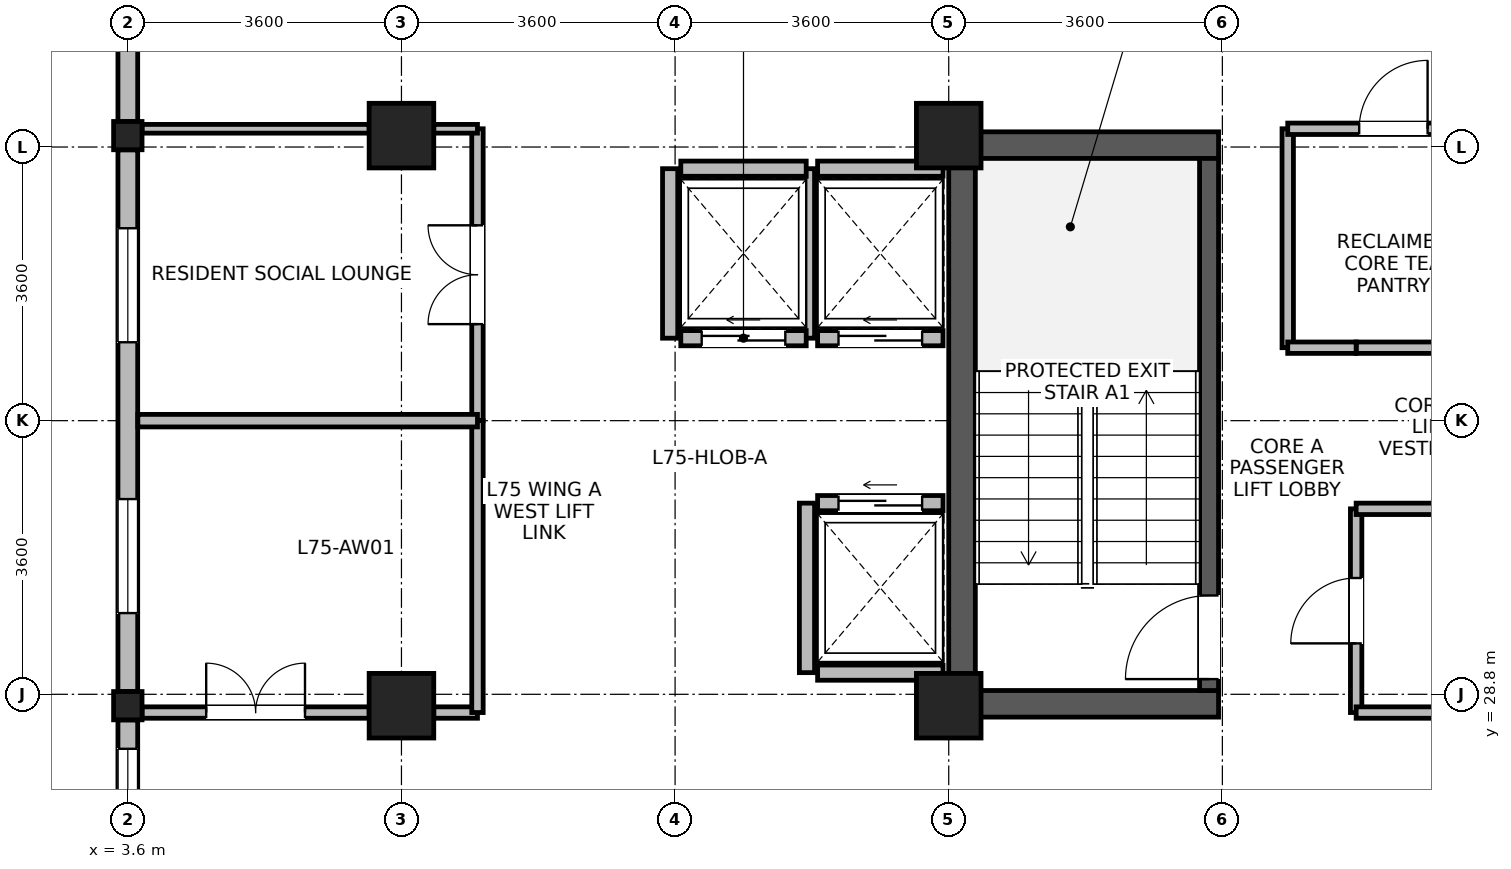
"""IFC4 building model, lengths in metres.
Left out: names, types, materials, properties, quantities, classifications, styles, units other than length and angle.
Written with IfcOpenShell. Run it as: python <this file> out.ifc"""

import sys

from ifc_helpers import new_model, si_unit, direction, frame, frame_2d, origin, origin_2d, place, context, subcontext, project, spatial, rectangle, i_section, extrude, source, transform, mapped, element, fill, save


model = new_model("IFC4")
c1 = context("Model", 3, precision=1e-05, world=origin(), true_north=direction((0.0, 1.0)))
c2 = subcontext(c1, "Body", "Model", "MODEL_VIEW")
j1 = project(units=[si_unit("LENGTHUNIT", "METRE"), si_unit("PLANEANGLEUNIT", "RADIAN")], contexts=[c1])
p1 = place(None, origin())
s1 = spatial("IfcSite", under=j1, at=p1, CompositionType="ELEMENT")
p2 = place(p1, origin())
s2 = spatial("IfcBuilding", under=s1, at=p2, CompositionType="ELEMENT")
p3 = place(p2, frame((0.0, 0.0, 290.6)))
s3 = spatial("IfcBuildingStorey", under=s2, at=p3, CompositionType="ELEMENT", Elevation=290.6)
p4 = place(p3, frame((14.575, 28.5, 0.0), z_axis=(0.0, 0.0, 1.0), x_axis=(0.0, 1.0, 0.0)))
e1 = element("IfcWall", 1, at=p4, inside=s3, PredefinedType="SHEAR", context=c2, shape_type="SweptSolid", body=[
    extrude(rectangle(XDim=7.7, YDim=0.35, at=frame_2d((3.85, 0.0))), origin(), (0.0, 0.0, 1.0), 3.475),
])
for number, where, z_axis, x_axis in (
    (2, (14.75, 28.675, 0.0), (0.0, 0.0, 1.0), (1.0, 0.0, 0.0)),
    (3, (14.75, 36.025, 0.0), (0.0, 0.0, 1.0), (1.0, 0.0, 0.0)),
):
    element("IfcWall", number, at=place(p3, frame(where, z_axis=z_axis, x_axis=x_axis)), inside=s3, PredefinedType="SHEAR", context=c2, shape_type="SweptSolid", body=[
        extrude(rectangle(XDim=3.2, YDim=0.35, at=frame_2d((1.6, 0.0))), origin(), (0.0, 0.0, 1.0), 3.475),
    ])
p5 = place(p3, frame((17.825, 28.85, 0.0), z_axis=(0.0, 0.0, 1.0), x_axis=(0.0, 1.0, 0.0)))
e4 = element("IfcWall", 4, at=p5, inside=s3, PredefinedType="SHEAR", context=c2, shape_type="SweptSolid", body=[
    extrude(rectangle(XDim=7.0, YDim=0.25, at=frame_2d((3.5, 0.0))), origin(), (0.0, 0.0, 1.0), 3.475),
])
p6 = place(p5, frame((0.15, 0.0, 0.0)))
e5 = element("IfcOpeningElement", 5, at=p6, cuts=e4, PredefinedType="OPENING", context=c2, shape_type="SweptSolid", body=[
    extrude(rectangle(XDim=1.1, YDim=2.08, at=frame_2d((0.55, 1.04))), frame((0.0, 0.135, 0.0), z_axis=(0.0, -1.0, 0.0), x_axis=(1.0, 0.0, 0.0)), (0.0, 0.0, 1.0), 0.27),
])
m1 = source(origin(), c2, "Body", "SweptSolid", [
    extrude(rectangle(XDim=0.85, YDim=0.85, at=origin_2d()), origin(), (0.0, 0.0, 1.0), 3.7),
])
for number, where, z_axis, x_axis in (
    (6, (7.2, 28.65, 0.0), (0.0, 0.0, 1.0), (1.0, 0.0, 0.0)),
    (7, (7.2, 36.15, 0.0), (0.0, 0.0, 1.0), (1.0, 0.0, 0.0)),
    (8, (14.4, 28.65, 0.0), (0.0, 0.0, 1.0), (1.0, 0.0, 0.0)),
    (9, (14.4, 36.15, 0.0), (0.0, 0.0, 1.0), (1.0, 0.0, 0.0)),
):
    element("IfcColumn", number, at=place(p3, frame(where, z_axis=z_axis, x_axis=x_axis)), inside=s3, PredefinedType="COLUMN", context=c2, shape_type="MappedRepresentation", body=[
        mapped(m1, transform((0.0, 0.0, 0.0), x_axis=(1.0, 0.0, 0.0), y_axis=(0.0, 1.0, 0.0), z_axis=(0.0, 0.0, 1.0), scale=1.0)),
    ])
m2 = source(origin(), c2, "Body", "SweptSolid", [
    extrude(i_section(OverallWidth=0.374, OverallDepth=0.372, WebThickness=0.015, FlangeThickness=0.026, FilletRadius=0.015, at=origin_2d()), origin(), (0.0, 0.0, 1.0), 3.7),
])
for number, where, z_axis, x_axis in (
    (10, (3.6, 28.65, 0.0), (0.0, 0.0, 1.0), (1.0, 0.0, 0.0)),
    (11, (3.6, 36.15, 0.0), (0.0, 0.0, 1.0), (1.0, 0.0, 0.0)),
):
    element("IfcColumn", number, at=place(p3, frame(where, z_axis=z_axis, x_axis=x_axis)), inside=s3, PredefinedType="COLUMN", context=c2, shape_type="MappedRepresentation", body=[
        mapped(m2, transform((0.0, 0.0, 0.0), x_axis=(1.0, 0.0, 0.0), y_axis=(0.0, 1.0, 0.0), z_axis=(0.0, 0.0, 1.0), scale=1.0)),
    ])
p7 = place(p3, frame((3.6, 36.337, 0.0), z_axis=(0.0, 0.0, 1.0), x_axis=(0.0, 1.0, 0.0)))
e12 = element("IfcWall", 12, at=p7, inside=s3, PredefinedType="STANDARD", context=c2, shape_type="SweptSolid", body=[
    extrude(rectangle(XDim=3.393, YDim=0.26, at=frame_2d((1.697, 0.0))), origin(), (0.0, 0.0, 1.0), 3.455),
])
p8 = place(p7, frame((0.947, 0.0, 0.85)))
e13 = element("IfcOpeningElement", 13, at=p8, cuts=e12, PredefinedType="OPENING", context=c2, shape_type="SweptSolid", body=[
    extrude(rectangle(XDim=1.5, YDim=1.85, at=frame_2d((0.75, 0.925))), frame((0.0, 0.14, 0.0), z_axis=(0.0, -1.0, 0.0), x_axis=(1.0, 0.0, 0.0)), (0.0, 0.0, 1.0), 0.28),
])
p9 = place(p3, frame((3.6, 28.837, 0.0), z_axis=(0.0, 0.0, 1.0), x_axis=(0.0, 1.0, 0.0)))
e14 = element("IfcWall", 14, at=p9, inside=s3, PredefinedType="STANDARD", context=c2, shape_type="SweptSolid", body=[
    extrude(rectangle(XDim=7.126, YDim=0.26, at=frame_2d((3.563, 0.0))), origin(), (0.0, 0.0, 1.0), 3.055),
])
p10 = place(p9, frame((1.031, 0.0, 0.85)))
e15 = element("IfcOpeningElement", 15, at=p10, cuts=e14, PredefinedType="OPENING", context=c2, shape_type="SweptSolid", body=[
    extrude(rectangle(XDim=1.5, YDim=1.85, at=frame_2d((0.75, 0.925))), frame((0.0, 0.14, 0.0), z_axis=(0.0, -1.0, 0.0), x_axis=(1.0, 0.0, 0.0)), (0.0, 0.0, 1.0), 0.28),
])
p11 = place(p9, frame((4.594, 0.0, 0.85)))
e16 = element("IfcOpeningElement", 16, at=p11, cuts=e14, PredefinedType="OPENING", context=c2, shape_type="SweptSolid", body=[
    extrude(rectangle(XDim=1.5, YDim=1.85, at=frame_2d((0.75, 0.925))), frame((0.0, 0.14, 0.0), z_axis=(0.0, -1.0, 0.0), x_axis=(1.0, 0.0, 0.0)), (0.0, 0.0, 1.0), 0.28),
])
p12 = place(p3, frame((3.6, 25.07, 0.0), z_axis=(0.0, 0.0, 1.0), x_axis=(0.0, 1.0, 0.0)))
e17 = element("IfcWall", 17, at=p12, inside=s3, PredefinedType="STANDARD", context=c2, shape_type="SweptSolid", body=[
    extrude(rectangle(XDim=3.393, YDim=0.26, at=frame_2d((1.696, 0.0))), origin(), (0.0, 0.0, 1.0), 3.455),
])
p13 = place(p12, frame((2.063, 0.0, 0.85)))
e18 = element("IfcOpeningElement", 18, at=p13, cuts=e17, PredefinedType="OPENING", context=c2, shape_type="SweptSolid", body=[
    extrude(rectangle(XDim=0.95, YDim=1.75, at=frame_2d((0.475, 0.875))), frame((0.0, 0.14, 0.0), z_axis=(0.0, -1.0, 0.0), x_axis=(1.0, 0.0, 0.0)), (0.0, 0.0, 1.0), 0.28),
])
p14 = place(p3, frame((12.675, 33.485, 0.0), z_axis=(0.0, 0.0, 1.0), x_axis=(1.0, 0.0, 0.0)))
e19 = element("IfcWall", 19, at=p14, inside=s3, PredefinedType="PARTITIONING", context=c2, shape_type="SweptSolid", body=[
    extrude(rectangle(XDim=1.65, YDim=0.2, at=frame_2d((0.825, 0.0))), origin(), (0.0, 0.0, 1.0), 3.455),
])
p15 = place(p14, frame((0.275, 0.0, 0.0)))
e20 = element("IfcOpeningElement", 20, at=p15, cuts=e19, PredefinedType="OPENING", context=c2, shape_type="SweptSolid", body=[
    extrude(rectangle(XDim=1.1, YDim=2.12, at=frame_2d((0.55, 1.06))), frame((0.0, 0.11, 0.0), z_axis=(0.0, -1.0, 0.0), x_axis=(1.0, 0.0, 0.0)), (0.0, 0.0, 1.0), 0.22),
])
p16 = place(p3, frame((12.675, 35.715, 0.0), z_axis=(0.0, 0.0, 1.0), x_axis=(1.0, 0.0, 0.0)))
e21 = element("IfcWall", 21, at=p16, inside=s3, PredefinedType="PARTITIONING", context=c2, shape_type="SweptSolid", body=[
    extrude(rectangle(XDim=1.65, YDim=0.2, at=frame_2d((0.825, 0.0))), origin(), (0.0, 0.0, 1.0), 3.455),
])
p17 = place(p3, frame((12.535, 33.485, 0.0), z_axis=(0.0, 0.0, 1.0), x_axis=(0.0, 1.0, 0.0)))
e22 = element("IfcWall", 22, at=p17, inside=s3, PredefinedType="PARTITIONING", context=c2, shape_type="SweptSolid", body=[
    extrude(rectangle(XDim=2.23, YDim=0.2, at=frame_2d((1.115, 0.0))), origin(), (0.0, 0.0, 1.0), 3.455),
])
p18 = place(p3, frame((12.675, 29.085, 0.0), z_axis=(0.0, 0.0, 1.0), x_axis=(1.0, 0.0, 0.0)))
e23 = element("IfcWall", 23, at=p18, inside=s3, PredefinedType="PARTITIONING", context=c2, shape_type="SweptSolid", body=[
    extrude(rectangle(XDim=1.65, YDim=0.2, at=frame_2d((0.825, 0.0))), origin(), (0.0, 0.0, 1.0), 3.455),
])
p19 = place(p3, frame((12.675, 31.315, 0.0), z_axis=(0.0, 0.0, 1.0), x_axis=(1.0, 0.0, 0.0)))
e24 = element("IfcWall", 24, at=p19, inside=s3, PredefinedType="PARTITIONING", context=c2, shape_type="SweptSolid", body=[
    extrude(rectangle(XDim=1.65, YDim=0.2, at=frame_2d((0.825, 0.0))), origin(), (0.0, 0.0, 1.0), 3.455),
])
p20 = place(p19, frame((0.275, 0.0, 0.0)))
e25 = element("IfcOpeningElement", 25, at=p20, cuts=e24, PredefinedType="OPENING", context=c2, shape_type="SweptSolid", body=[
    extrude(rectangle(XDim=1.1, YDim=2.12, at=frame_2d((0.55, 1.06))), frame((0.0, 0.11, 0.0), z_axis=(0.0, -1.0, 0.0), x_axis=(1.0, 0.0, 0.0)), (0.0, 0.0, 1.0), 0.22),
])
p21 = place(p3, frame((12.535, 29.085, 0.0), z_axis=(0.0, 0.0, 1.0), x_axis=(0.0, 1.0, 0.0)))
e26 = element("IfcWall", 26, at=p21, inside=s3, PredefinedType="PARTITIONING", context=c2, shape_type="SweptSolid", body=[
    extrude(rectangle(XDim=2.23, YDim=0.2, at=frame_2d((1.115, 0.0))), origin(), (0.0, 0.0, 1.0), 3.455),
])
p22 = place(p3, frame((10.875, 33.485, 0.0), z_axis=(0.0, 0.0, 1.0), x_axis=(1.0, 0.0, 0.0)))
e27 = element("IfcWall", 27, at=p22, inside=s3, PredefinedType="PARTITIONING", context=c2, shape_type="SweptSolid", body=[
    extrude(rectangle(XDim=1.65, YDim=0.2, at=frame_2d((0.825, 0.0))), origin(), (0.0, 0.0, 1.0), 3.455),
])
p23 = place(p22, frame((0.275, 0.0, 0.0)))
e28 = element("IfcOpeningElement", 28, at=p23, cuts=e27, PredefinedType="OPENING", context=c2, shape_type="SweptSolid", body=[
    extrude(rectangle(XDim=1.1, YDim=2.12, at=frame_2d((0.55, 1.06))), frame((0.0, 0.11, 0.0), z_axis=(0.0, -1.0, 0.0), x_axis=(1.0, 0.0, 0.0)), (0.0, 0.0, 1.0), 0.22),
])
p24 = place(p3, frame((10.875, 35.715, 0.0), z_axis=(0.0, 0.0, 1.0), x_axis=(1.0, 0.0, 0.0)))
e29 = element("IfcWall", 29, at=p24, inside=s3, PredefinedType="PARTITIONING", context=c2, shape_type="SweptSolid", body=[
    extrude(rectangle(XDim=1.65, YDim=0.2, at=frame_2d((0.825, 0.0))), origin(), (0.0, 0.0, 1.0), 3.455),
])
p25 = place(p3, frame((10.735, 33.485, 0.0), z_axis=(0.0, 0.0, 1.0), x_axis=(0.0, 1.0, 0.0)))
e30 = element("IfcWall", 30, at=p25, inside=s3, PredefinedType="PARTITIONING", context=c2, shape_type="SweptSolid", body=[
    extrude(rectangle(XDim=2.23, YDim=0.2, at=frame_2d((1.115, 0.0))), origin(), (0.0, 0.0, 1.0), 3.455),
])
p26 = place(p3, frame((3.787, 28.56, 0.0), z_axis=(0.0, 0.0, 1.0), x_axis=(1.0, 0.0, 0.0)))
e31 = element("IfcWall", 31, at=p26, inside=s3, PredefinedType="PARTITIONING", context=c2, shape_type="SweptSolid", body=[
    extrude(rectangle(XDim=2.988, YDim=0.15, at=frame_2d((1.494, 0.0))), origin(), (0.0, 0.0, 1.0), 2.905),
])
p27 = place(p26, frame((0.844, 0.0, 0.0)))
e32 = element("IfcOpeningElement", 32, at=p27, cuts=e31, PredefinedType="OPENING", context=c2, shape_type="SweptSolid", body=[
    extrude(rectangle(XDim=1.3, YDim=2.12, at=frame_2d((0.65, 1.06))), frame((0.0, 0.085, 0.0), z_axis=(0.0, -1.0, 0.0), x_axis=(1.0, 0.0, 0.0)), (0.0, 0.0, 1.0), 0.17),
])
p28 = place(p3, frame((7.625, 28.56, 0.0), z_axis=(0.0, 0.0, 1.0), x_axis=(1.0, 0.0, 0.0)))
e33 = element("IfcWall", 33, at=p28, inside=s3, PredefinedType="PARTITIONING", context=c2, shape_type="SweptSolid", body=[
    extrude(rectangle(XDim=0.575, YDim=0.15, at=frame_2d((0.288, 0.0))), origin(), (0.0, 0.0, 1.0), 2.905),
])
p29 = place(p3, frame((8.2, 32.4, 0.0), z_axis=(0.0, 0.0, 1.0), x_axis=(0.0, 1.0, 0.0)))
e34 = element("IfcWall", 34, at=p29, inside=s3, PredefinedType="PARTITIONING", context=c2, shape_type="SweptSolid", body=[
    extrude(rectangle(XDim=3.84, YDim=0.15, at=frame_2d((1.92, 0.0))), origin(), (0.0, 0.0, 1.0), 3.455),
])
p30 = place(p29, frame((1.27, 0.0, 0.0)))
e35 = element("IfcOpeningElement", 35, at=p30, cuts=e34, PredefinedType="OPENING", context=c2, shape_type="SweptSolid", body=[
    extrude(rectangle(XDim=1.3, YDim=2.12, at=frame_2d((0.65, 1.06))), frame((0.0, 0.085, 0.0), z_axis=(0.0, -1.0, 0.0), x_axis=(1.0, 0.0, 0.0)), (0.0, 0.0, 1.0), 0.17),
])
p31 = place(p3, frame((8.2, 28.56, 0.0), z_axis=(0.0, 0.0, 1.0), x_axis=(0.0, 1.0, 0.0)))
e36 = element("IfcWall", 36, at=p31, inside=s3, PredefinedType="PARTITIONING", context=c2, shape_type="SweptSolid", body=[
    extrude(rectangle(XDim=3.84, YDim=0.15, at=frame_2d((1.92, 0.0))), origin(), (0.0, 0.0, 1.0), 3.455),
])
p32 = place(p3, frame((18.86, 33.36, 0.0), z_axis=(0.0, 0.0, 1.0), x_axis=(0.0, 1.0, 0.0)))
e37 = element("IfcWall", 37, at=p32, inside=s3, PredefinedType="PARTITIONING", context=c2, shape_type="SweptSolid", body=[
    extrude(rectangle(XDim=2.88, YDim=0.15, at=frame_2d((1.44, 0.0))), origin(), (0.0, 0.0, 1.0), 3.455),
])
p33 = place(p3, frame((18.86, 36.24, 0.0), z_axis=(0.0, 0.0, 1.0), x_axis=(1.0, 0.0, 0.0)))
e38 = element("IfcWall", 38, at=p33, inside=s3, PredefinedType="PARTITIONING", context=c2, shape_type="SweptSolid", body=[
    extrude(rectangle(XDim=2.78, YDim=0.15, at=frame_2d((1.39, 0.0))), origin(), (0.0, 0.0, 1.0), 2.555),
])
p34 = place(p33, frame((0.94, 0.0, 0.0)))
e39 = element("IfcOpeningElement", 39, at=p34, cuts=e38, PredefinedType="OPENING", context=c2, shape_type="SweptSolid", body=[
    extrude(rectangle(XDim=0.9, YDim=2.08, at=frame_2d((0.45, 1.04))), frame((0.0, 0.085, 0.0), z_axis=(0.0, -1.0, 0.0), x_axis=(1.0, 0.0, 0.0)), (0.0, 0.0, 1.0), 0.17),
])
p35 = place(p3, frame((19.76, 28.56, 0.0), z_axis=(0.0, 0.0, 1.0), x_axis=(0.0, 1.0, 0.0)))
e40 = element("IfcWall", 40, at=p35, inside=s3, PredefinedType="PARTITIONING", context=c2, shape_type="SweptSolid", body=[
    extrude(rectangle(XDim=2.68, YDim=0.15, at=frame_2d((1.34, 0.0))), origin(), (0.0, 0.0, 1.0), 3.455),
])
p36 = place(p35, frame((0.91, 0.0, 0.0)))
e41 = element("IfcOpeningElement", 41, at=p36, cuts=e40, PredefinedType="OPENING", context=c2, shape_type="SweptSolid", body=[
    extrude(rectangle(XDim=0.86, YDim=2.02, at=frame_2d((0.43, 1.01))), frame((0.0, 0.085, 0.0), z_axis=(0.0, -1.0, 0.0), x_axis=(1.0, 0.0, 0.0)), (0.0, 0.0, 1.0), 0.17),
])
p37 = place(p3, frame((19.76, 28.56, 0.0), z_axis=(0.0, 0.0, 1.0), x_axis=(1.0, 0.0, 0.0)))
e42 = element("IfcWall", 42, at=p37, inside=s3, PredefinedType="PARTITIONING", context=c2, shape_type="SweptSolid", body=[
    extrude(rectangle(XDim=2.0, YDim=0.15, at=frame_2d((1.0, 0.0))), origin(), (0.0, 0.0, 1.0), 2.555),
])
p38 = place(p3, frame((19.76, 31.24, 0.0), z_axis=(0.0, 0.0, 1.0), x_axis=(1.0, 0.0, 0.0)))
e43 = element("IfcWall", 43, at=p38, inside=s3, PredefinedType="PARTITIONING", context=c2, shape_type="SweptSolid", body=[
    extrude(rectangle(XDim=2.0, YDim=0.15, at=frame_2d((1.0, 0.0))), origin(), (0.0, 0.0, 1.0), 3.455),
])
p39 = place(p3, frame((19.76, 33.36, 0.0), z_axis=(0.0, 0.0, 1.0), x_axis=(1.0, 0.0, 0.0)))
e44 = element("IfcWall", 44, at=p39, inside=s3, PredefinedType="PARTITIONING", context=c2, shape_type="SweptSolid", body=[
    extrude(rectangle(XDim=1.85, YDim=0.15, at=frame_2d((0.925, 0.0))), origin(), (0.0, 0.0, 1.0), 3.455),
])
p40 = place(p3, frame((18.86, 33.36, 0.0), z_axis=(0.0, 0.0, 1.0), x_axis=(1.0, 0.0, 0.0)))
e45 = element("IfcWall", 45, at=p40, inside=s3, PredefinedType="PARTITIONING", context=c2, shape_type="SweptSolid", body=[
    extrude(rectangle(XDim=0.9, YDim=0.15, at=frame_2d((0.45, 0.0))), origin(), (0.0, 0.0, 1.0), 3.455),
])
p41 = place(p3, frame((3.732, 32.4, 0.0), z_axis=(0.0, 0.0, 1.0), x_axis=(1.0, 0.0, 0.0)))
e46 = element("IfcWall", 46, at=p41, inside=s3, PredefinedType="PARTITIONING", context=c2, shape_type="SweptSolid", body=[
    extrude(rectangle(XDim=4.468, YDim=0.165, at=frame_2d((2.234, 0.0))), origin(), (0.0, 0.0, 1.0), 3.455),
])
p42 = place(p3, frame((3.787, 36.24, 0.0), z_axis=(0.0, 0.0, 1.0), x_axis=(1.0, 0.0, 0.0)))
e47 = element("IfcWall", 47, at=p42, inside=s3, PredefinedType="PARTITIONING", context=c2, shape_type="SweptSolid", body=[
    extrude(rectangle(XDim=2.988, YDim=0.115, at=frame_2d((1.494, 0.0))), origin(), (0.0, 0.0, 1.0), 2.905),
])
p43 = place(p3, frame((7.625, 36.24, 0.0), z_axis=(0.0, 0.0, 1.0), x_axis=(1.0, 0.0, 0.0)))
e48 = element("IfcWall", 48, at=p43, inside=s3, PredefinedType="PARTITIONING", context=c2, shape_type="SweptSolid", body=[
    extrude(rectangle(XDim=0.575, YDim=0.115, at=frame_2d((0.288, 0.0))), origin(), (0.0, 0.0, 1.0), 2.905),
])
p44 = place(p10, origin())
e49 = element("IfcWindow", 49, at=p44, inside=s3, PartitioningType="SINGLE_PANEL", PredefinedType="WINDOW", context=c2, shape_type="SweptSolid", body=[
    extrude(rectangle(XDim=1.5, YDim=1.85, at=frame_2d((0.75, 0.925))), frame((0.0, 0.03, 0.0), z_axis=(0.0, -1.0, 0.0), x_axis=(1.0, 0.0, 0.0)), (0.0, 0.0, 1.0), 0.06),
])
fill(e15, e49)
p45 = place(p11, origin())
e50 = element("IfcWindow", 50, at=p45, inside=s3, PartitioningType="SINGLE_PANEL", PredefinedType="WINDOW", context=c2, shape_type="SweptSolid", body=[
    extrude(rectangle(XDim=1.5, YDim=1.85, at=frame_2d((0.75, 0.925))), frame((0.0, 0.03, 0.0), z_axis=(0.0, -1.0, 0.0), x_axis=(1.0, 0.0, 0.0)), (0.0, 0.0, 1.0), 0.06),
])
fill(e16, e50)
p46 = place(p13, origin())
e51 = element("IfcWindow", 51, at=p46, inside=s3, PartitioningType="SINGLE_PANEL", PredefinedType="WINDOW", context=c2, shape_type="SweptSolid", body=[
    extrude(rectangle(XDim=0.95, YDim=1.75, at=frame_2d((0.475, 0.875))), frame((0.0, 0.03, 0.0), z_axis=(0.0, -1.0, 0.0), x_axis=(1.0, 0.0, 0.0)), (0.0, 0.0, 1.0), 0.06),
])
fill(e18, e51)
p47 = place(p6, origin())
e52 = element("IfcDoor", 52, at=p47, inside=s3, OperationType="SINGLE_SWING_LEFT", PredefinedType="DOOR", context=c2, shape_type="SweptSolid", body=[
    extrude(rectangle(XDim=1.1, YDim=2.08, at=frame_2d((0.55, 1.04))), frame((0.0, 0.025, 0.0), z_axis=(0.0, -1.0, 0.0), x_axis=(1.0, 0.0, 0.0)), (0.0, 0.0, 1.0), 0.05),
])
fill(e5, e52)
p48 = place(p15, origin())
e53 = element("IfcDoor", 53, at=p48, inside=s3, OperationType="SLIDING_TO_LEFT", PredefinedType="DOOR", context=c2, shape_type="SweptSolid", body=[
    extrude(rectangle(XDim=1.1, YDim=2.12, at=frame_2d((0.55, 1.06))), frame((0.0, 0.025, 0.0), z_axis=(0.0, -1.0, 0.0), x_axis=(1.0, 0.0, 0.0)), (0.0, 0.0, 1.0), 0.05),
])
fill(e20, e53)
p49 = place(p20, origin())
e54 = element("IfcDoor", 54, at=p49, inside=s3, OperationType="SLIDING_TO_LEFT", PredefinedType="DOOR", context=c2, shape_type="SweptSolid", body=[
    extrude(rectangle(XDim=1.1, YDim=2.12, at=frame_2d((0.55, 1.06))), frame((0.0, 0.025, 0.0), z_axis=(0.0, -1.0, 0.0), x_axis=(1.0, 0.0, 0.0)), (0.0, 0.0, 1.0), 0.05),
])
fill(e25, e54)
p50 = place(p23, origin())
e55 = element("IfcDoor", 55, at=p50, inside=s3, OperationType="SLIDING_TO_LEFT", PredefinedType="DOOR", context=c2, shape_type="SweptSolid", body=[
    extrude(rectangle(XDim=1.1, YDim=2.12, at=frame_2d((0.55, 1.06))), frame((0.0, 0.025, 0.0), z_axis=(0.0, -1.0, 0.0), x_axis=(1.0, 0.0, 0.0)), (0.0, 0.0, 1.0), 0.05),
])
fill(e28, e55)
p51 = place(p27, origin())
e56 = element("IfcDoor", 56, at=p51, inside=s3, OperationType="DOUBLE_DOOR_SINGLE_SWING", PredefinedType="DOOR", context=c2, shape_type="SweptSolid", body=[
    extrude(rectangle(XDim=1.3, YDim=2.12, at=frame_2d((0.65, 1.06))), frame((0.0, 0.025, 0.0), z_axis=(0.0, -1.0, 0.0), x_axis=(1.0, 0.0, 0.0)), (0.0, 0.0, 1.0), 0.05),
])
fill(e32, e56)
p52 = place(p30, origin())
e57 = element("IfcDoor", 57, at=p52, inside=s3, OperationType="DOUBLE_DOOR_SINGLE_SWING", PredefinedType="DOOR", context=c2, shape_type="SweptSolid", body=[
    extrude(rectangle(XDim=1.3, YDim=2.12, at=frame_2d((0.65, 1.06))), frame((0.0, 0.025, 0.0), z_axis=(0.0, -1.0, 0.0), x_axis=(1.0, 0.0, 0.0)), (0.0, 0.0, 1.0), 0.05),
])
fill(e35, e57)
p53 = place(p34, origin())
e58 = element("IfcDoor", 58, at=p53, inside=s3, OperationType="SINGLE_SWING_RIGHT", PredefinedType="DOOR", context=c2, shape_type="SweptSolid", body=[
    extrude(rectangle(XDim=0.9, YDim=2.08, at=frame_2d((0.45, 1.04))), frame((0.0, 0.025, 0.0), z_axis=(0.0, -1.0, 0.0), x_axis=(1.0, 0.0, 0.0)), (0.0, 0.0, 1.0), 0.05),
])
fill(e39, e58)
p54 = place(p36, origin())
e59 = element("IfcDoor", 59, at=p54, inside=s3, OperationType="SINGLE_SWING_LEFT", PredefinedType="DOOR", context=c2, shape_type="SweptSolid", body=[
    extrude(rectangle(XDim=0.86, YDim=2.02, at=frame_2d((0.43, 1.01))), frame((0.0, 0.025, 0.0), z_axis=(0.0, -1.0, 0.0), x_axis=(1.0, 0.0, 0.0)), (0.0, 0.0, 1.0), 0.05),
])
fill(e41, e59)
save(model, sys.argv[1])
